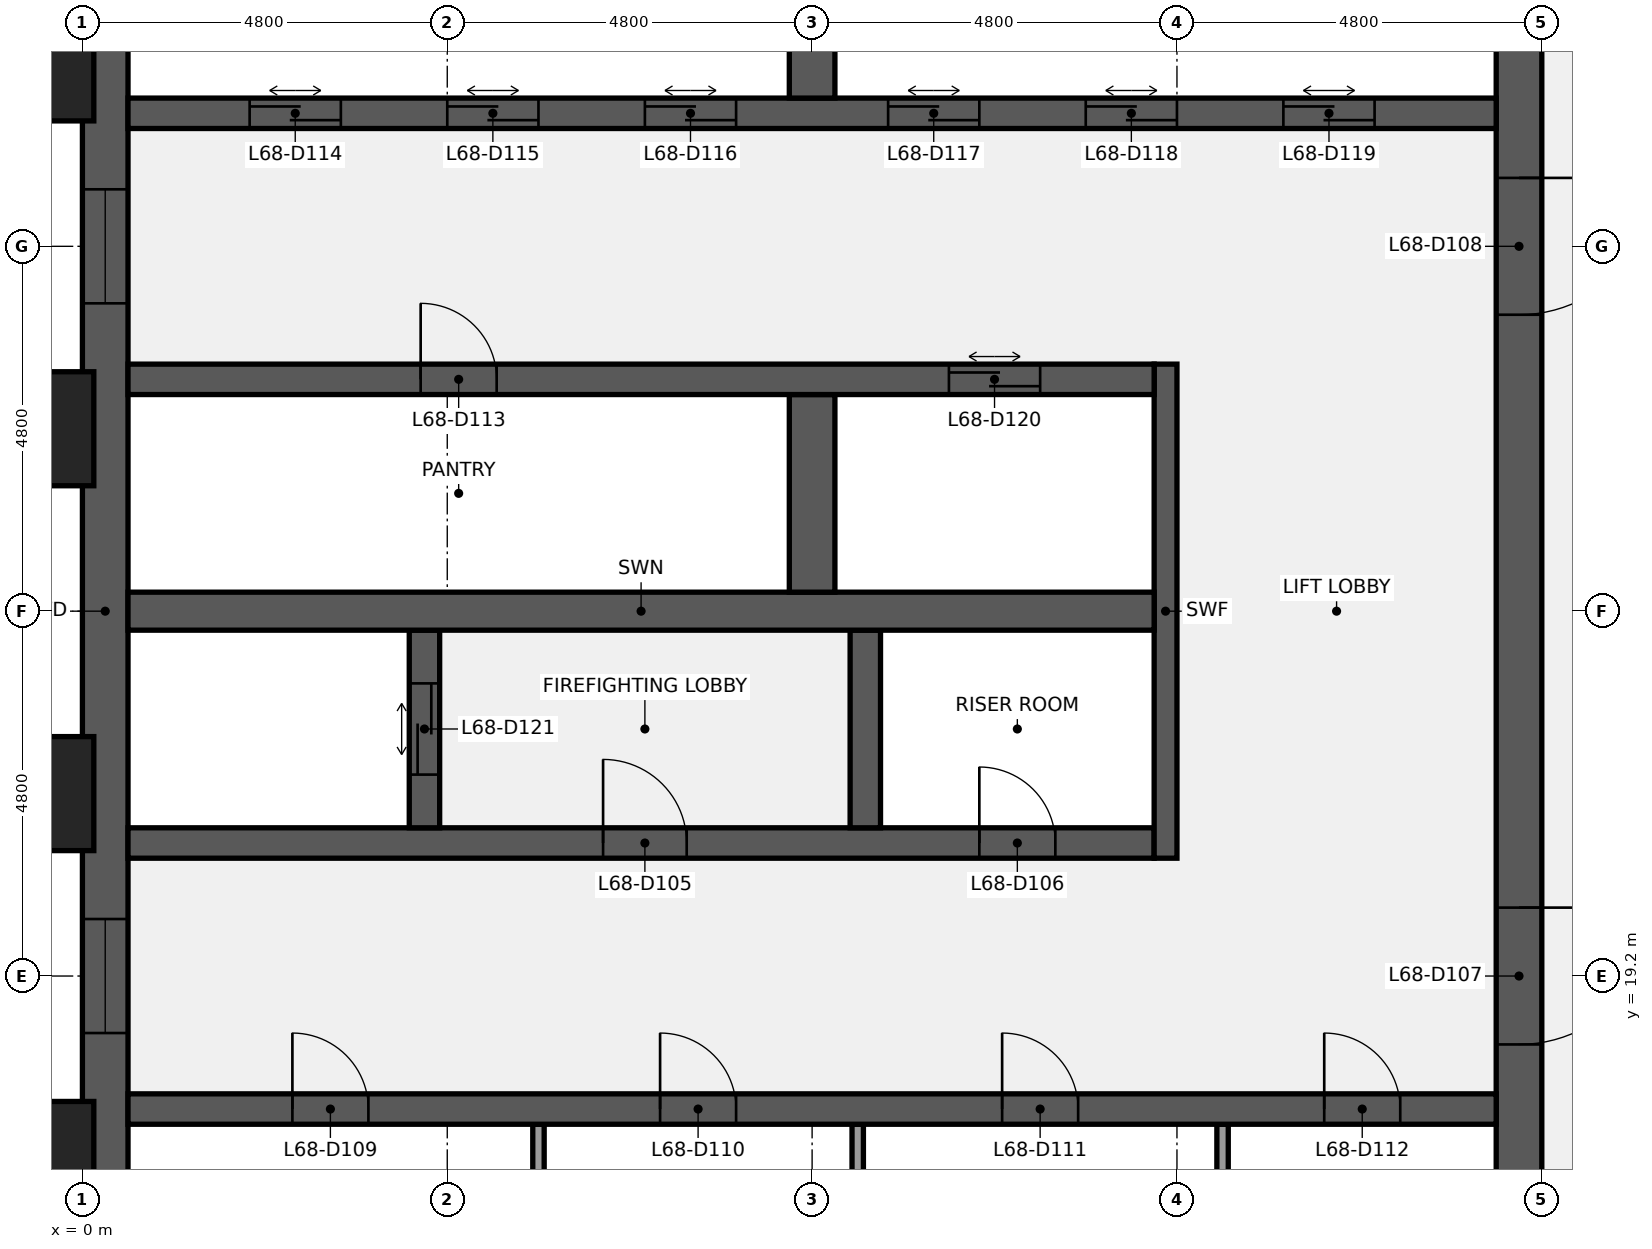
"""IFC4 building model, lengths in metres.
Left out: names, types, materials, properties, quantities, classifications, styles, units other than length and angle.
Written with IfcOpenShell. Run it as: python <this file> out.ifc"""

import sys

from ifc_helpers import new_model, si_unit, direction, frame, frame_2d, origin, origin_2d, place, context, subcontext, project, spatial, rectangle, extrude, element, fill, save


model = new_model("IFC4")
c1 = context("Model", 3, precision=1e-05, world=origin(), true_north=direction((0.0, 1.0)))
c2 = subcontext(c1, "Body", "Model", "MODEL_VIEW")
j1 = project(units=[si_unit("LENGTHUNIT", "METRE"), si_unit("PLANEANGLEUNIT", "RADIAN")], contexts=[c1])
p1 = place(None, origin())
s1 = spatial("IfcSite", under=j1, at=p1, CompositionType="ELEMENT")
p2 = place(p1, origin())
s2 = spatial("IfcBuilding", under=s1, at=p2, CompositionType="ELEMENT")
p3 = place(p2, frame((0.0, 0.0, 310.3)))
s3 = spatial("IfcBuildingStorey", under=s2, at=p3, CompositionType="ELEMENT", Elevation=310.3)
p4 = place(p3, frame((0.3, 9.6, 0.0), z_axis=(0.0, 0.0, 1.0), x_axis=(0.0, 1.0, 0.0)))
e1 = element("IfcWall", 1, at=p4, inside=s3, PredefinedType="SHEAR", context=c2, shape_type="SweptSolid", body=[
    extrude(rectangle(XDim=28.8, YDim=0.6, at=frame_2d((14.4, 0.0))), origin(), (0.0, 0.0, 1.0), 3.84),
])
p5 = place(p4, frame((8.85, 0.0, 0.9)))
e2 = element("IfcOpeningElement", 2, at=p5, cuts=e1, PredefinedType="OPENING", context=c2, shape_type="SweptSolid", body=[
    extrude(rectangle(XDim=1.5, YDim=1.5, at=frame_2d((0.75, 0.75))), frame((0.0, 0.31, 0.0), z_axis=(0.0, -1.0, 0.0), x_axis=(1.0, 0.0, 0.0)), (0.0, 0.0, 1.0), 0.62),
])
p6 = place(p4, frame((18.45, 0.0, 0.9)))
e3 = element("IfcOpeningElement", 3, at=p6, cuts=e1, PredefinedType="OPENING", context=c2, shape_type="SweptSolid", body=[
    extrude(rectangle(XDim=1.5, YDim=1.5, at=frame_2d((0.75, 0.75))), frame((0.0, 0.31, 0.0), z_axis=(0.0, -1.0, 0.0), x_axis=(1.0, 0.0, 0.0)), (0.0, 0.0, 1.0), 0.62),
])
p7 = place(p3, frame((18.9, 38.4, 0.0), z_axis=(0.0, 0.0, 1.0), x_axis=(0.0, -1.0, 0.0)))
e4 = element("IfcWall", 4, at=p7, inside=s3, PredefinedType="SHEAR", context=c2, shape_type="SweptSolid", body=[
    extrude(rectangle(XDim=28.8, YDim=0.6, at=frame_2d((14.4, 0.0))), origin(), (0.0, 0.0, 1.0), 3.84),
])
p8 = place(p7, frame((18.3, 0.0, 0.0)))
e5 = element("IfcOpeningElement", 5, at=p8, cuts=e4, PredefinedType="OPENING", context=c2, shape_type="SweptSolid", body=[
    extrude(rectangle(XDim=1.8, YDim=2.1, at=frame_2d((0.9, 1.05))), frame((0.0, 0.31, 0.0), z_axis=(0.0, -1.0, 0.0), x_axis=(1.0, 0.0, 0.0)), (0.0, 0.0, 1.0), 0.62),
])
p9 = place(p7, frame((8.7, 0.0, 0.0)))
e6 = element("IfcOpeningElement", 6, at=p9, cuts=e4, PredefinedType="OPENING", context=c2, shape_type="SweptSolid", body=[
    extrude(rectangle(XDim=1.8, YDim=2.1, at=frame_2d((0.9, 1.05))), frame((0.0, 0.31, 0.0), z_axis=(0.0, -1.0, 0.0), x_axis=(1.0, 0.0, 0.0)), (0.0, 0.0, 1.0), 0.62),
])
for number, where, z_axis, x_axis in (
    (7, (6.0, 14.65, 0.0), (0.0, 0.0, 1.0), (0.0, 1.0, 0.0)),
    (8, (10.2, 14.65, 0.0), (0.0, 0.0, 1.0), (0.0, 1.0, 0.0)),
    (9, (15.0, 14.65, 0.0), (0.0, 0.0, 1.0), (0.0, 1.0, 0.0)),
):
    element("IfcWall", number, at=place(p3, frame(where, z_axis=z_axis, x_axis=x_axis)), inside=s3, PredefinedType="PARTITIONING", context=c2, shape_type="SweptSolid", body=[
        extrude(rectangle(XDim=2.6, YDim=0.15, at=frame_2d((1.3, 0.0))), origin(), (0.0, 0.0, 1.0), 3.84),
    ])
p10 = place(p3, frame((0.6, 17.45, 0.0), z_axis=(0.0, 0.0, 1.0), x_axis=(1.0, 0.0, 0.0)))
e10 = element("IfcWall", 10, at=p10, inside=s3, PredefinedType="SHEAR", context=c2, shape_type="SweptSolid", body=[
    extrude(rectangle(XDim=18.0, YDim=0.4, at=frame_2d((9.0, 0.0))), origin(), (0.0, 0.0, 1.0), 3.84),
])
p11 = place(p10, frame((2.163, 0.0, 0.0)))
e11 = element("IfcOpeningElement", 11, at=p11, cuts=e10, PredefinedType="OPENING", context=c2, shape_type="SweptSolid", body=[
    extrude(rectangle(XDim=1.0, YDim=2.1, at=frame_2d((0.5, 1.05))), frame((0.0, 0.21, 0.0), z_axis=(0.0, -1.0, 0.0), x_axis=(1.0, 0.0, 0.0)), (0.0, 0.0, 1.0), 0.42),
])
p12 = place(p10, frame((7.0, 0.0, 0.0)))
e12 = element("IfcOpeningElement", 12, at=p12, cuts=e10, PredefinedType="OPENING", context=c2, shape_type="SweptSolid", body=[
    extrude(rectangle(XDim=1.0, YDim=2.1, at=frame_2d((0.5, 1.05))), frame((0.0, 0.21, 0.0), z_axis=(0.0, -1.0, 0.0), x_axis=(1.0, 0.0, 0.0)), (0.0, 0.0, 1.0), 0.42),
])
p13 = place(p10, frame((11.5, 0.0, 0.0)))
e13 = element("IfcOpeningElement", 13, at=p13, cuts=e10, PredefinedType="OPENING", context=c2, shape_type="SweptSolid", body=[
    extrude(rectangle(XDim=1.0, YDim=2.1, at=frame_2d((0.5, 1.05))), frame((0.0, 0.21, 0.0), z_axis=(0.0, -1.0, 0.0), x_axis=(1.0, 0.0, 0.0)), (0.0, 0.0, 1.0), 0.42),
])
p14 = place(p10, frame((15.738, 0.0, 0.0)))
e14 = element("IfcOpeningElement", 14, at=p14, cuts=e10, PredefinedType="OPENING", context=c2, shape_type="SweptSolid", body=[
    extrude(rectangle(XDim=1.0, YDim=2.1, at=frame_2d((0.5, 1.05))), frame((0.0, 0.21, 0.0), z_axis=(0.0, -1.0, 0.0), x_axis=(1.0, 0.0, 0.0)), (0.0, 0.0, 1.0), 0.42),
])
p15 = place(p3, frame((0.6, 20.95, 0.0), z_axis=(0.0, 0.0, 1.0), x_axis=(1.0, 0.0, 0.0)))
e15 = element("IfcWall", 15, at=p15, inside=s3, PredefinedType="SHEAR", context=c2, shape_type="SweptSolid", body=[
    extrude(rectangle(XDim=13.5, YDim=0.4, at=frame_2d((6.75, 0.0))), origin(), (0.0, 0.0, 1.0), 3.84),
])
p16 = place(p15, frame((6.25, 0.0, 0.0)))
e16 = element("IfcOpeningElement", 16, at=p16, cuts=e15, PredefinedType="OPENING", context=c2, shape_type="SweptSolid", body=[
    extrude(rectangle(XDim=1.1, YDim=2.1, at=frame_2d((0.55, 1.05))), frame((0.0, 0.21, 0.0), z_axis=(0.0, -1.0, 0.0), x_axis=(1.0, 0.0, 0.0)), (0.0, 0.0, 1.0), 0.42),
])
p17 = place(p15, frame((11.2, 0.0, 0.0)))
e17 = element("IfcOpeningElement", 17, at=p17, cuts=e15, PredefinedType="OPENING", context=c2, shape_type="SweptSolid", body=[
    extrude(rectangle(XDim=1.0, YDim=2.1, at=frame_2d((0.5, 1.05))), frame((0.0, 0.21, 0.0), z_axis=(0.0, -1.0, 0.0), x_axis=(1.0, 0.0, 0.0)), (0.0, 0.0, 1.0), 0.42),
])
p18 = place(p3, frame((14.25, 20.75, 0.0), z_axis=(0.0, 0.0, 1.0), x_axis=(0.0, 1.0, 0.0)))
e18 = element("IfcWall", 18, at=p18, inside=s3, PredefinedType="SHEAR", context=c2, shape_type="SweptSolid", body=[
    extrude(rectangle(XDim=6.5, YDim=0.3, at=frame_2d((3.25, 0.0))), origin(), (0.0, 0.0, 1.0), 3.84),
])
p19 = place(p3, frame((4.5, 21.15, 0.0), z_axis=(0.0, 0.0, 1.0), x_axis=(0.0, 1.0, 0.0)))
e19 = element("IfcWall", 19, at=p19, inside=s3, PredefinedType="SHEAR", context=c2, shape_type="SweptSolid", body=[
    extrude(rectangle(XDim=2.6, YDim=0.4, at=frame_2d((1.3, 0.0))), origin(), (0.0, 0.0, 1.0), 3.84),
])
p20 = place(p19, frame((0.7, 0.0, 0.0)))
e20 = element("IfcOpeningElement", 20, at=p20, cuts=e19, PredefinedType="OPENING", context=c2, shape_type="SweptSolid", body=[
    extrude(rectangle(XDim=1.2, YDim=2.1, at=frame_2d((0.6, 1.05))), frame((0.0, 0.21, 0.0), z_axis=(0.0, -1.0, 0.0), x_axis=(1.0, 0.0, 0.0)), (0.0, 0.0, 1.0), 0.42),
])
p21 = place(p3, frame((10.3, 21.15, 0.0), z_axis=(0.0, 0.0, 1.0), x_axis=(0.0, 1.0, 0.0)))
e21 = element("IfcWall", 21, at=p21, inside=s3, PredefinedType="SHEAR", context=c2, shape_type="SweptSolid", body=[
    extrude(rectangle(XDim=2.6, YDim=0.4, at=frame_2d((1.3, 0.0))), origin(), (0.0, 0.0, 1.0), 3.84),
])
p22 = place(p3, frame((0.6, 24.0, 0.0), z_axis=(0.0, 0.0, 1.0), x_axis=(1.0, 0.0, 0.0)))
e22 = element("IfcWall", 22, at=p22, inside=s3, PredefinedType="SHEAR", context=c2, shape_type="SweptSolid", body=[
    extrude(rectangle(XDim=13.5, YDim=0.5, at=frame_2d((6.75, 0.0))), origin(), (0.0, 0.0, 1.0), 3.84),
])
p23 = place(p3, frame((9.6, 24.25, 0.0), z_axis=(0.0, 0.0, 1.0), x_axis=(0.0, 1.0, 0.0)))
e23 = element("IfcWall", 23, at=p23, inside=s3, PredefinedType="SHEAR", context=c2, shape_type="SweptSolid", body=[
    extrude(rectangle(XDim=2.6, YDim=0.6, at=frame_2d((1.3, 0.0))), origin(), (0.0, 0.0, 1.0), 3.84),
])
p24 = place(p3, frame((0.6, 27.05, 0.0), z_axis=(0.0, 0.0, 1.0), x_axis=(1.0, 0.0, 0.0)))
e24 = element("IfcWall", 24, at=p24, inside=s3, PredefinedType="SHEAR", context=c2, shape_type="SweptSolid", body=[
    extrude(rectangle(XDim=13.5, YDim=0.4, at=frame_2d((6.75, 0.0))), origin(), (0.0, 0.0, 1.0), 3.84),
])
p25 = place(p24, frame((3.85, 0.0, 0.0)))
e25 = element("IfcOpeningElement", 25, at=p25, cuts=e24, PredefinedType="OPENING", context=c2, shape_type="SweptSolid", body=[
    extrude(rectangle(XDim=1.0, YDim=2.1, at=frame_2d((0.5, 1.05))), frame((0.0, 0.21, 0.0), z_axis=(0.0, -1.0, 0.0), x_axis=(1.0, 0.0, 0.0)), (0.0, 0.0, 1.0), 0.42),
])
p26 = place(p24, frame((10.8, 0.0, 0.0)))
e26 = element("IfcOpeningElement", 26, at=p26, cuts=e24, PredefinedType="OPENING", context=c2, shape_type="SweptSolid", body=[
    extrude(rectangle(XDim=1.2, YDim=2.1, at=frame_2d((0.6, 1.05))), frame((0.0, 0.21, 0.0), z_axis=(0.0, -1.0, 0.0), x_axis=(1.0, 0.0, 0.0)), (0.0, 0.0, 1.0), 0.42),
])
p27 = place(p3, frame((0.6, 30.55, 0.0), z_axis=(0.0, 0.0, 1.0), x_axis=(1.0, 0.0, 0.0)))
e27 = element("IfcWall", 27, at=p27, inside=s3, PredefinedType="SHEAR", context=c2, shape_type="SweptSolid", body=[
    extrude(rectangle(XDim=18.0, YDim=0.4, at=frame_2d((9.0, 0.0))), origin(), (0.0, 0.0, 1.0), 3.84),
])
p28 = place(p27, frame((1.6, 0.0, 0.0)))
e28 = element("IfcOpeningElement", 28, at=p28, cuts=e27, PredefinedType="OPENING", context=c2, shape_type="SweptSolid", body=[
    extrude(rectangle(XDim=1.2, YDim=2.1, at=frame_2d((0.6, 1.05))), frame((0.0, 0.21, 0.0), z_axis=(0.0, -1.0, 0.0), x_axis=(1.0, 0.0, 0.0)), (0.0, 0.0, 1.0), 0.42),
])
p29 = place(p27, frame((4.2, 0.0, 0.0)))
e29 = element("IfcOpeningElement", 29, at=p29, cuts=e27, PredefinedType="OPENING", context=c2, shape_type="SweptSolid", body=[
    extrude(rectangle(XDim=1.2, YDim=2.1, at=frame_2d((0.6, 1.05))), frame((0.0, 0.21, 0.0), z_axis=(0.0, -1.0, 0.0), x_axis=(1.0, 0.0, 0.0)), (0.0, 0.0, 1.0), 0.42),
])
p30 = place(p27, frame((6.8, 0.0, 0.0)))
e30 = element("IfcOpeningElement", 30, at=p30, cuts=e27, PredefinedType="OPENING", context=c2, shape_type="SweptSolid", body=[
    extrude(rectangle(XDim=1.2, YDim=2.1, at=frame_2d((0.6, 1.05))), frame((0.0, 0.21, 0.0), z_axis=(0.0, -1.0, 0.0), x_axis=(1.0, 0.0, 0.0)), (0.0, 0.0, 1.0), 0.42),
])
p31 = place(p27, frame((10.0, 0.0, 0.0)))
e31 = element("IfcOpeningElement", 31, at=p31, cuts=e27, PredefinedType="OPENING", context=c2, shape_type="SweptSolid", body=[
    extrude(rectangle(XDim=1.2, YDim=2.1, at=frame_2d((0.6, 1.05))), frame((0.0, 0.21, 0.0), z_axis=(0.0, -1.0, 0.0), x_axis=(1.0, 0.0, 0.0)), (0.0, 0.0, 1.0), 0.42),
])
p32 = place(p27, frame((12.6, 0.0, 0.0)))
e32 = element("IfcOpeningElement", 32, at=p32, cuts=e27, PredefinedType="OPENING", context=c2, shape_type="SweptSolid", body=[
    extrude(rectangle(XDim=1.2, YDim=2.1, at=frame_2d((0.6, 1.05))), frame((0.0, 0.21, 0.0), z_axis=(0.0, -1.0, 0.0), x_axis=(1.0, 0.0, 0.0)), (0.0, 0.0, 1.0), 0.42),
])
p33 = place(p27, frame((15.2, 0.0, 0.0)))
e33 = element("IfcOpeningElement", 33, at=p33, cuts=e27, PredefinedType="OPENING", context=c2, shape_type="SweptSolid", body=[
    extrude(rectangle(XDim=1.2, YDim=2.1, at=frame_2d((0.6, 1.05))), frame((0.0, 0.21, 0.0), z_axis=(0.0, -1.0, 0.0), x_axis=(1.0, 0.0, 0.0)), (0.0, 0.0, 1.0), 0.42),
])
p34 = place(p3, frame((9.6, 30.75, 0.0), z_axis=(0.0, 0.0, 1.0), x_axis=(0.0, 1.0, 0.0)))
e34 = element("IfcWall", 34, at=p34, inside=s3, PredefinedType="SHEAR", context=c2, shape_type="SweptSolid", body=[
    extrude(rectangle(XDim=2.6, YDim=0.6, at=frame_2d((1.3, 0.0))), origin(), (0.0, 0.0, 1.0), 3.84),
])
for number, where, z_axis, x_axis in (
    (35, (-0.75, 16.8, 0.0), (0.0, 0.0, 1.0), (0.0, 1.0, 0.0)),
    (36, (-0.75, 21.6, 0.0), (0.0, 0.0, 1.0), (0.0, 1.0, 0.0)),
    (37, (-0.75, 26.4, 0.0), (0.0, 0.0, 1.0), (0.0, 1.0, 0.0)),
    (38, (-0.75, 31.2, 0.0), (0.0, 0.0, 1.0), (0.0, 1.0, 0.0)),
):
    element("IfcColumn", number, at=place(p3, frame(where, z_axis=z_axis, x_axis=x_axis)), inside=s3, PredefinedType="PILASTER", context=c2, shape_type="SweptSolid", body=[
        extrude(rectangle(XDim=1.8, YDim=1.5, at=origin_2d()), origin(), (0.0, 0.0, 1.0), 4.0),
    ])
p35 = place(p16, origin())
e39 = element("IfcDoor", 39, at=p35, inside=s3, OperationType="SINGLE_SWING_LEFT", PredefinedType="DOOR", context=c2, shape_type="SweptSolid", body=[
    extrude(rectangle(XDim=1.1, YDim=2.1, at=frame_2d((0.55, 1.05))), frame((0.0, 0.025, 0.0), z_axis=(0.0, -1.0, 0.0), x_axis=(1.0, 0.0, 0.0)), (0.0, 0.0, 1.0), 0.05),
])
fill(e16, e39)
p36 = place(p17, origin())
e40 = element("IfcDoor", 40, at=p36, inside=s3, OperationType="SINGLE_SWING_LEFT", PredefinedType="DOOR", context=c2, shape_type="SweptSolid", body=[
    extrude(rectangle(XDim=1.0, YDim=2.1, at=frame_2d((0.5, 1.05))), frame((0.0, 0.025, 0.0), z_axis=(0.0, -1.0, 0.0), x_axis=(1.0, 0.0, 0.0)), (0.0, 0.0, 1.0), 0.05),
])
fill(e17, e40)
p37 = place(p8, origin())
e41 = element("IfcDoor", 41, at=p37, inside=s3, OperationType="DOUBLE_DOOR_SINGLE_SWING", PredefinedType="DOOR", context=c2, shape_type="SweptSolid", body=[
    extrude(rectangle(XDim=1.8, YDim=2.1, at=frame_2d((0.9, 1.05))), frame((0.0, 0.025, 0.0), z_axis=(0.0, -1.0, 0.0), x_axis=(1.0, 0.0, 0.0)), (0.0, 0.0, 1.0), 0.05),
])
fill(e5, e41)
p38 = place(p9, origin())
e42 = element("IfcDoor", 42, at=p38, inside=s3, OperationType="DOUBLE_DOOR_SINGLE_SWING", PredefinedType="DOOR", context=c2, shape_type="SweptSolid", body=[
    extrude(rectangle(XDim=1.8, YDim=2.1, at=frame_2d((0.9, 1.05))), frame((0.0, 0.025, 0.0), z_axis=(0.0, -1.0, 0.0), x_axis=(1.0, 0.0, 0.0)), (0.0, 0.0, 1.0), 0.05),
])
fill(e6, e42)
p39 = place(p11, origin())
e43 = element("IfcDoor", 43, at=p39, inside=s3, OperationType="SINGLE_SWING_LEFT", PredefinedType="DOOR", context=c2, shape_type="SweptSolid", body=[
    extrude(rectangle(XDim=1.0, YDim=2.1, at=frame_2d((0.5, 1.05))), frame((0.0, 0.025, 0.0), z_axis=(0.0, -1.0, 0.0), x_axis=(1.0, 0.0, 0.0)), (0.0, 0.0, 1.0), 0.05),
])
fill(e11, e43)
p40 = place(p12, origin())
e44 = element("IfcDoor", 44, at=p40, inside=s3, OperationType="SINGLE_SWING_LEFT", PredefinedType="DOOR", context=c2, shape_type="SweptSolid", body=[
    extrude(rectangle(XDim=1.0, YDim=2.1, at=frame_2d((0.5, 1.05))), frame((0.0, 0.025, 0.0), z_axis=(0.0, -1.0, 0.0), x_axis=(1.0, 0.0, 0.0)), (0.0, 0.0, 1.0), 0.05),
])
fill(e12, e44)
p41 = place(p13, origin())
e45 = element("IfcDoor", 45, at=p41, inside=s3, OperationType="SINGLE_SWING_LEFT", PredefinedType="DOOR", context=c2, shape_type="SweptSolid", body=[
    extrude(rectangle(XDim=1.0, YDim=2.1, at=frame_2d((0.5, 1.05))), frame((0.0, 0.025, 0.0), z_axis=(0.0, -1.0, 0.0), x_axis=(1.0, 0.0, 0.0)), (0.0, 0.0, 1.0), 0.05),
])
fill(e13, e45)
p42 = place(p14, origin())
e46 = element("IfcDoor", 46, at=p42, inside=s3, OperationType="SINGLE_SWING_LEFT", PredefinedType="DOOR", context=c2, shape_type="SweptSolid", body=[
    extrude(rectangle(XDim=1.0, YDim=2.1, at=frame_2d((0.5, 1.05))), frame((0.0, 0.025, 0.0), z_axis=(0.0, -1.0, 0.0), x_axis=(1.0, 0.0, 0.0)), (0.0, 0.0, 1.0), 0.05),
])
fill(e14, e46)
p43 = place(p25, origin())
e47 = element("IfcDoor", 47, at=p43, inside=s3, OperationType="SINGLE_SWING_LEFT", PredefinedType="DOOR", context=c2, shape_type="SweptSolid", body=[
    extrude(rectangle(XDim=1.0, YDim=2.1, at=frame_2d((0.5, 1.05))), frame((0.0, 0.025, 0.0), z_axis=(0.0, -1.0, 0.0), x_axis=(1.0, 0.0, 0.0)), (0.0, 0.0, 1.0), 0.05),
])
fill(e25, e47)
p44 = place(p28, origin())
e48 = element("IfcDoor", 48, at=p44, inside=s3, OperationType="DOUBLE_DOOR_SLIDING", PredefinedType="DOOR", context=c2, shape_type="SweptSolid", body=[
    extrude(rectangle(XDim=1.2, YDim=2.1, at=frame_2d((0.6, 1.05))), frame((0.0, 0.025, 0.0), z_axis=(0.0, -1.0, 0.0), x_axis=(1.0, 0.0, 0.0)), (0.0, 0.0, 1.0), 0.05),
])
fill(e28, e48)
p45 = place(p29, origin())
e49 = element("IfcDoor", 49, at=p45, inside=s3, OperationType="DOUBLE_DOOR_SLIDING", PredefinedType="DOOR", context=c2, shape_type="SweptSolid", body=[
    extrude(rectangle(XDim=1.2, YDim=2.1, at=frame_2d((0.6, 1.05))), frame((0.0, 0.025, 0.0), z_axis=(0.0, -1.0, 0.0), x_axis=(1.0, 0.0, 0.0)), (0.0, 0.0, 1.0), 0.05),
])
fill(e29, e49)
p46 = place(p30, origin())
e50 = element("IfcDoor", 50, at=p46, inside=s3, OperationType="DOUBLE_DOOR_SLIDING", PredefinedType="DOOR", context=c2, shape_type="SweptSolid", body=[
    extrude(rectangle(XDim=1.2, YDim=2.1, at=frame_2d((0.6, 1.05))), frame((0.0, 0.025, 0.0), z_axis=(0.0, -1.0, 0.0), x_axis=(1.0, 0.0, 0.0)), (0.0, 0.0, 1.0), 0.05),
])
fill(e30, e50)
p47 = place(p31, origin())
e51 = element("IfcDoor", 51, at=p47, inside=s3, OperationType="DOUBLE_DOOR_SLIDING", PredefinedType="DOOR", context=c2, shape_type="SweptSolid", body=[
    extrude(rectangle(XDim=1.2, YDim=2.1, at=frame_2d((0.6, 1.05))), frame((0.0, 0.025, 0.0), z_axis=(0.0, -1.0, 0.0), x_axis=(1.0, 0.0, 0.0)), (0.0, 0.0, 1.0), 0.05),
])
fill(e31, e51)
p48 = place(p32, origin())
e52 = element("IfcDoor", 52, at=p48, inside=s3, OperationType="DOUBLE_DOOR_SLIDING", PredefinedType="DOOR", context=c2, shape_type="SweptSolid", body=[
    extrude(rectangle(XDim=1.2, YDim=2.1, at=frame_2d((0.6, 1.05))), frame((0.0, 0.025, 0.0), z_axis=(0.0, -1.0, 0.0), x_axis=(1.0, 0.0, 0.0)), (0.0, 0.0, 1.0), 0.05),
])
fill(e32, e52)
p49 = place(p33, origin())
e53 = element("IfcDoor", 53, at=p49, inside=s3, OperationType="DOUBLE_DOOR_SLIDING", PredefinedType="DOOR", context=c2, shape_type="SweptSolid", body=[
    extrude(rectangle(XDim=1.2, YDim=2.1, at=frame_2d((0.6, 1.05))), frame((0.0, 0.025, 0.0), z_axis=(0.0, -1.0, 0.0), x_axis=(1.0, 0.0, 0.0)), (0.0, 0.0, 1.0), 0.05),
])
fill(e33, e53)
p50 = place(p26, origin())
e54 = element("IfcDoor", 54, at=p50, inside=s3, OperationType="DOUBLE_DOOR_SLIDING", PredefinedType="DOOR", context=c2, shape_type="SweptSolid", body=[
    extrude(rectangle(XDim=1.2, YDim=2.1, at=frame_2d((0.6, 1.05))), frame((0.0, 0.025, 0.0), z_axis=(0.0, -1.0, 0.0), x_axis=(1.0, 0.0, 0.0)), (0.0, 0.0, 1.0), 0.05),
])
fill(e26, e54)
p51 = place(p20, origin())
e55 = element("IfcDoor", 55, at=p51, inside=s3, OperationType="DOUBLE_DOOR_SLIDING", PredefinedType="DOOR", context=c2, shape_type="SweptSolid", body=[
    extrude(rectangle(XDim=1.2, YDim=2.1, at=frame_2d((0.6, 1.05))), frame((0.0, 0.025, 0.0), z_axis=(0.0, -1.0, 0.0), x_axis=(1.0, 0.0, 0.0)), (0.0, 0.0, 1.0), 0.05),
])
fill(e20, e55)
p52 = place(p5, origin())
e56 = element("IfcWindow", 56, at=p52, inside=s3, PartitioningType="SINGLE_PANEL", PredefinedType="WINDOW", context=c2, shape_type="SweptSolid", body=[
    extrude(rectangle(XDim=1.5, YDim=1.5, at=frame_2d((0.75, 0.75))), frame((0.0, 0.03, 0.0), z_axis=(0.0, -1.0, 0.0), x_axis=(1.0, 0.0, 0.0)), (0.0, 0.0, 1.0), 0.06),
])
fill(e2, e56)
p53 = place(p6, origin())
e57 = element("IfcWindow", 57, at=p53, inside=s3, PartitioningType="SINGLE_PANEL", PredefinedType="WINDOW", context=c2, shape_type="SweptSolid", body=[
    extrude(rectangle(XDim=1.5, YDim=1.5, at=frame_2d((0.75, 0.75))), frame((0.0, 0.03, 0.0), z_axis=(0.0, -1.0, 0.0), x_axis=(1.0, 0.0, 0.0)), (0.0, 0.0, 1.0), 0.06),
])
fill(e3, e57)
save(model, sys.argv[1])
